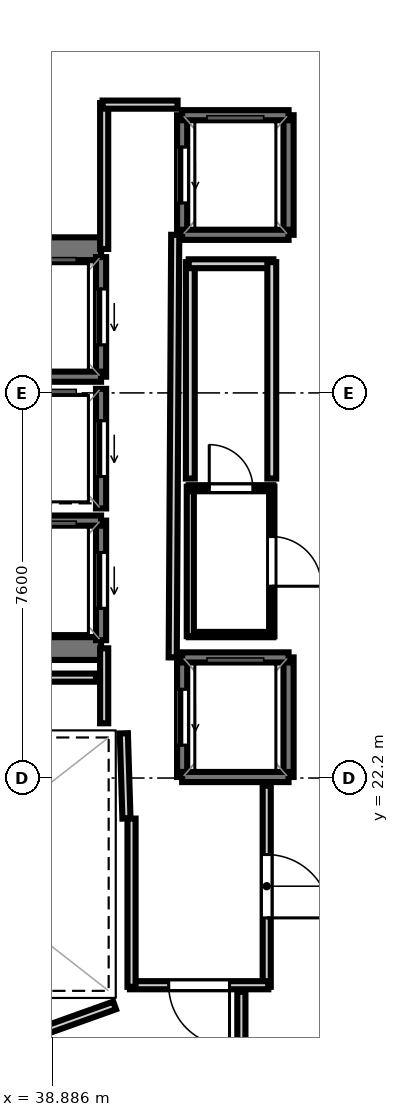
"""IFC4 building model, lengths in metres.
Left out: names, types, materials, properties, quantities, classifications, styles, units other than length and angle.
Written with IfcOpenShell. Run it as: python <this file> out.ifc"""

import sys

from ifc_helpers import new_model, si_unit, direction, frame, frame_2d, origin, place, context, subcontext, project, spatial, rectangle, extrude, element, fill, save


model = new_model("IFC4")
c1 = context("Model", 3, precision=1e-05, world=origin(), true_north=direction((0.0, 1.0)))
c2 = subcontext(c1, "Body", "Model", "MODEL_VIEW")
j1 = project(units=[si_unit("LENGTHUNIT", "METRE"), si_unit("PLANEANGLEUNIT", "RADIAN")], contexts=[c1])
p1 = place(None, origin())
s1 = spatial("IfcSite", under=j1, at=p1, CompositionType="ELEMENT")
p2 = place(p1, origin())
s2 = spatial("IfcBuilding", under=s1, at=p2, CompositionType="ELEMENT")
p3 = place(p2, frame((0.0, 0.0, 325.9)))
s3 = spatial("IfcBuildingStorey", under=s2, at=p3, CompositionType="ELEMENT", Elevation=325.9)
p4 = place(p3, frame((29.33, 32.645, 0.0), z_axis=(0.0, 0.0, 1.0), x_axis=(1.0, 0.0, 0.0)))
e1 = element("IfcWall", 1, at=p4, inside=s3, PredefinedType="SHEAR", context=c2, shape_type="SweptSolid", body=[
    extrude(rectangle(XDim=10.52, YDim=0.45, at=frame_2d((5.26, 0.0))), origin(), (0.0, 0.0, 1.0), 3.52),
])
p5 = place(p4, frame((0.895, 0.0, 0.0)))
e2 = element("IfcOpeningElement", 2, at=p5, cuts=e1, PredefinedType="OPENING", context=c2, shape_type="SweptSolid", body=[
    extrude(rectangle(XDim=1.25, YDim=2.15, at=frame_2d((0.625, 1.075))), frame((0.0, 0.235, 0.0), z_axis=(0.0, -1.0, 0.0), x_axis=(1.0, 0.0, 0.0)), (0.0, 0.0, 1.0), 0.47),
])
p6 = place(p3, frame((29.33, 24.755, 0.0), z_axis=(0.0, 0.0, 1.0), x_axis=(1.0, 0.0, 0.0)))
e3 = element("IfcWall", 3, at=p6, inside=s3, PredefinedType="SHEAR", context=c2, shape_type="SweptSolid", body=[
    extrude(rectangle(XDim=10.52, YDim=0.45, at=frame_2d((5.26, 0.0))), origin(), (0.0, 0.0, 1.0), 3.52),
])
p7 = place(p6, frame((0.695, 0.0, 0.0)))
e4 = element("IfcOpeningElement", 4, at=p7, cuts=e3, PredefinedType="OPENING", context=c2, shape_type="SweptSolid", body=[
    extrude(rectangle(XDim=1.25, YDim=2.15, at=frame_2d((0.625, 1.075))), frame((0.0, 0.235, 0.0), z_axis=(0.0, -1.0, 0.0), x_axis=(1.0, 0.0, 0.0)), (0.0, 0.0, 1.0), 0.47),
])
p8 = place(p3, frame((39.85, 30.12, 0.0), z_axis=(0.0, 0.0, 1.0), x_axis=(0.0, 1.0, 0.0)))
e5 = element("IfcWall", 5, at=p8, inside=s3, PredefinedType="SOLIDWALL", context=c2, shape_type="SweptSolid", body=[
    extrude(rectangle(XDim=2.36, YDim=0.2, at=frame_2d((1.18, 0.0))), origin(), (0.0, 0.0, 1.0), 3.52),
])
p9 = place(p8, frame((0.63, 0.0, 0.0)))
e6 = element("IfcOpeningElement", 6, at=p9, cuts=e5, PredefinedType="OPENING", context=c2, shape_type="SweptSolid", body=[
    extrude(rectangle(XDim=1.1, YDim=2.15, at=frame_2d((0.55, 1.075))), frame((0.0, 0.11, 0.0), z_axis=(0.0, -1.0, 0.0), x_axis=(1.0, 0.0, 0.0)), (0.0, 0.0, 1.0), 0.22),
])
p10 = place(p3, frame((37.75, 30.12, 0.0), z_axis=(0.0, 0.0, 1.0), x_axis=(1.0, 0.0, 0.0)))
e7 = element("IfcWall", 7, at=p10, inside=s3, PredefinedType="SOLIDWALL", context=c2, shape_type="SweptSolid", body=[
    extrude(rectangle(XDim=2.1, YDim=0.2, at=frame_2d((1.05, 0.0))), origin(), (0.0, 0.0, 1.0), 3.52),
])
p11 = place(p3, frame((39.85, 24.92, 0.0), z_axis=(0.0, 0.0, 1.0), x_axis=(0.0, 1.0, 0.0)))
e8 = element("IfcWall", 8, at=p11, inside=s3, PredefinedType="SOLIDWALL", context=c2, shape_type="SweptSolid", body=[
    extrude(rectangle(XDim=2.36, YDim=0.2, at=frame_2d((1.18, 0.0))), origin(), (0.0, 0.0, 1.0), 3.52),
])
p12 = place(p11, frame((0.63, 0.0, 0.0)))
e9 = element("IfcOpeningElement", 9, at=p12, cuts=e8, PredefinedType="OPENING", context=c2, shape_type="SweptSolid", body=[
    extrude(rectangle(XDim=1.1, YDim=2.15, at=frame_2d((0.55, 1.075))), frame((0.0, 0.11, 0.0), z_axis=(0.0, -1.0, 0.0), x_axis=(1.0, 0.0, 0.0)), (0.0, 0.0, 1.0), 0.22),
])
p13 = place(p3, frame((37.75, 27.28, 0.0), z_axis=(0.0, 0.0, 1.0), x_axis=(1.0, 0.0, 0.0)))
e10 = element("IfcWall", 10, at=p13, inside=s3, PredefinedType="SOLIDWALL", context=c2, shape_type="SweptSolid", body=[
    extrude(rectangle(XDim=2.1, YDim=0.2, at=frame_2d((1.05, 0.0))), origin(), (0.0, 0.0, 1.0), 3.52),
])
p14 = place(p3, frame((39.85, 27.52, 0.0), z_axis=(0.0, 0.0, 1.0), x_axis=(0.0, 1.0, 0.0)))
e11 = element("IfcWall", 11, at=p14, inside=s3, PredefinedType="SOLIDWALL", context=c2, shape_type="SweptSolid", body=[
    extrude(rectangle(XDim=2.36, YDim=0.2, at=frame_2d((1.18, 0.0))), origin(), (0.0, 0.0, 1.0), 3.52),
])
p15 = place(p14, frame((0.63, 0.0, 0.0)))
e12 = element("IfcOpeningElement", 12, at=p15, cuts=e11, PredefinedType="OPENING", context=c2, shape_type="SweptSolid", body=[
    extrude(rectangle(XDim=1.1, YDim=2.15, at=frame_2d((0.55, 1.075))), frame((0.0, 0.11, 0.0), z_axis=(0.0, -1.0, 0.0), x_axis=(1.0, 0.0, 0.0)), (0.0, 0.0, 1.0), 0.22),
])
p16 = place(p3, frame((43.55, 22.22, 0.0), z_axis=(0.0, 0.0, 1.0), x_axis=(0.0, 1.0, 0.0)))
e13 = element("IfcWall", 13, at=p16, inside=s3, PredefinedType="SOLIDWALL", context=c2, shape_type="SweptSolid", body=[
    extrude(rectangle(XDim=2.36, YDim=0.2, at=frame_2d((1.18, 0.0))), origin(), (0.0, 0.0, 1.0), 3.52),
])
p17 = place(p3, frame((41.45, 22.22, 0.0), z_axis=(0.0, 0.0, 1.0), x_axis=(0.0, 1.0, 0.0)))
e14 = element("IfcWall", 14, at=p17, inside=s3, PredefinedType="SOLIDWALL", context=c2, shape_type="SweptSolid", body=[
    extrude(rectangle(XDim=2.36, YDim=0.2, at=frame_2d((1.18, 0.0))), origin(), (0.0, 0.0, 1.0), 3.52),
])
p18 = place(p17, frame((0.63, 0.0, 0.0)))
e15 = element("IfcOpeningElement", 15, at=p18, cuts=e14, PredefinedType="OPENING", context=c2, shape_type="SweptSolid", body=[
    extrude(rectangle(XDim=1.1, YDim=2.15, at=frame_2d((0.55, 1.075))), frame((0.0, 0.11, 0.0), z_axis=(0.0, -1.0, 0.0), x_axis=(1.0, 0.0, 0.0)), (0.0, 0.0, 1.0), 0.22),
])
for number, where, z_axis, x_axis in (
    (16, (41.45, 24.58, 0.0), (0.0, 0.0, 1.0), (1.0, 0.0, 0.0)),
    (17, (41.45, 22.22, 0.0), (0.0, 0.0, 1.0), (1.0, 0.0, 0.0)),
):
    element("IfcWall", number, at=place(p3, frame(where, z_axis=z_axis, x_axis=x_axis)), inside=s3, PredefinedType="SOLIDWALL", context=c2, shape_type="SweptSolid", body=[
        extrude(rectangle(XDim=2.1, YDim=0.2, at=frame_2d((1.05, 0.0))), origin(), (0.0, 0.0, 1.0), 3.52),
    ])
p19 = place(p3, frame((43.55, 32.92, 0.0), z_axis=(0.0, 0.0, 1.0), x_axis=(0.0, 1.0, 0.0)))
e18 = element("IfcWall", 18, at=p19, inside=s3, PredefinedType="SOLIDWALL", context=c2, shape_type="SweptSolid", body=[
    extrude(rectangle(XDim=2.36, YDim=0.2, at=frame_2d((1.18, 0.0))), origin(), (0.0, 0.0, 1.0), 3.52),
])
p20 = place(p3, frame((41.45, 32.92, 0.0), z_axis=(0.0, 0.0, 1.0), x_axis=(0.0, 1.0, 0.0)))
e19 = element("IfcWall", 19, at=p20, inside=s3, PredefinedType="SOLIDWALL", context=c2, shape_type="SweptSolid", body=[
    extrude(rectangle(XDim=2.36, YDim=0.2, at=frame_2d((1.18, 0.0))), origin(), (0.0, 0.0, 1.0), 3.52),
])
p21 = place(p20, frame((0.63, 0.0, 0.0)))
e20 = element("IfcOpeningElement", 20, at=p21, cuts=e19, PredefinedType="OPENING", context=c2, shape_type="SweptSolid", body=[
    extrude(rectangle(XDim=1.1, YDim=2.15, at=frame_2d((0.55, 1.075))), frame((0.0, 0.11, 0.0), z_axis=(0.0, -1.0, 0.0), x_axis=(1.0, 0.0, 0.0)), (0.0, 0.0, 1.0), 0.22),
])
for number, where, z_axis, x_axis in (
    (21, (41.45, 35.28, 0.0), (0.0, 0.0, 1.0), (1.0, 0.0, 0.0)),
    (22, (41.45, 32.92, 0.0), (0.0, 0.0, 1.0), (1.0, 0.0, 0.0)),
):
    element("IfcWall", number, at=place(p3, frame(where, z_axis=z_axis, x_axis=x_axis)), inside=s3, PredefinedType="SOLIDWALL", context=c2, shape_type="SweptSolid", body=[
        extrude(rectangle(XDim=2.1, YDim=0.2, at=frame_2d((1.05, 0.0))), origin(), (0.0, 0.0, 1.0), 3.52),
    ])
p22 = place(p3, frame((40.351, 21.401, 0.0), z_axis=(0.0, 0.0, 1.0), x_axis=(-0.031058045979, 0.999517582527, 0.0)))
e23 = element("IfcWall", 23, at=p22, inside=s3, PredefinedType="PARTITIONING", context=c2, shape_type="SweptSolid", body=[
    extrude(rectangle(XDim=1.682, YDim=0.16, at=frame_2d((0.841, 0.0))), origin(), (0.0, 0.0, 1.0), 2.84),
])
p23 = place(p3, frame((39.911, 23.28, 0.0), z_axis=(0.0, 0.0, 1.0), x_axis=(0.0, 1.0, 0.0)))
e24 = element("IfcWall", 24, at=p23, inside=s3, PredefinedType="PARTITIONING", context=c2, shape_type="SweptSolid", body=[
    extrude(rectangle(XDim=1.48, YDim=0.16, at=frame_2d((0.74, 0.0))), origin(), (0.0, 0.0, 1.0), 2.84),
])
p24 = place(p3, frame((39.911, 32.64, 0.0), z_axis=(0.0, 0.0, 1.0), x_axis=(0.0, 1.0, 0.0)))
e25 = element("IfcWall", 25, at=p24, inside=s3, PredefinedType="PARTITIONING", context=c2, shape_type="SweptSolid", body=[
    extrude(rectangle(XDim=2.88, YDim=0.16, at=frame_2d((1.44, 0.0))), origin(), (0.0, 0.0, 1.0), 2.84),
])
p25 = place(p3, frame((39.88, 35.489, 0.0), z_axis=(0.0, 0.0, 1.0), x_axis=(1.0, 0.0, 0.0)))
e26 = element("IfcWall", 26, at=p25, inside=s3, PredefinedType="PARTITIONING", context=c2, shape_type="SweptSolid", body=[
    extrude(rectangle(XDim=1.48, YDim=0.16, at=frame_2d((0.74, 0.0))), origin(), (0.0, 0.0, 1.0), 2.84),
])
p26 = place(p3, frame((41.313, 32.92, 0.0), z_axis=(0.0, 0.0, 1.0), x_axis=(-0.005942518022, -0.999982343084, 0.0)))
e27 = element("IfcWall", 27, at=p26, inside=s3, PredefinedType="PARTITIONING", context=c2, shape_type="SweptSolid", body=[
    extrude(rectangle(XDim=8.34, YDim=0.16, at=frame_2d((4.17, 0.0))), origin(), (0.0, 0.0, 1.0), 2.84),
])
p27 = place(p3, frame((43.119, 22.05, 0.0), z_axis=(0.0, 0.0, 1.0), x_axis=(0.0, -1.0, 0.0)))
e28 = element("IfcWall", 28, at=p27, inside=s3, PredefinedType="PARTITIONING", context=c2, shape_type="SweptSolid", body=[
    extrude(rectangle(XDim=3.97, YDim=0.16, at=frame_2d((1.985, 0.0))), origin(), (0.0, 0.0, 1.0), 2.84),
])
p28 = place(p27, frame((1.36, 0.0, 0.0)))
e29 = element("IfcOpeningElement", 29, at=p28, cuts=e28, PredefinedType="OPENING", context=c2, shape_type="SweptSolid", body=[
    extrude(rectangle(XDim=1.25, YDim=2.2, at=frame_2d((0.625, 1.1))), frame((0.0, 0.09, 0.0), z_axis=(0.0, -1.0, 0.0), x_axis=(1.0, 0.0, 0.0)), (0.0, 0.0, 1.0), 0.18),
])
p29 = place(p3, frame((43.15, 18.111, 0.0), z_axis=(0.0, 0.0, 1.0), x_axis=(-1.0, 0.0, 0.0)))
e30 = element("IfcWall", 30, at=p29, inside=s3, PredefinedType="PARTITIONING", context=c2, shape_type="SweptSolid", body=[
    extrude(rectangle(XDim=2.73, YDim=0.16, at=frame_2d((1.365, 0.0))), origin(), (0.0, 0.0, 1.0), 2.84),
])
p30 = place(p29, frame((0.765, 0.0, 0.0)))
e31 = element("IfcOpeningElement", 31, at=p30, cuts=e30, PredefinedType="OPENING", context=c2, shape_type="SweptSolid", body=[
    extrude(rectangle(XDim=1.2, YDim=2.15, at=frame_2d((0.6, 1.075))), frame((0.0, 0.09, 0.0), z_axis=(0.0, -1.0, 0.0), x_axis=(1.0, 0.0, 0.0)), (0.0, 0.0, 1.0), 0.18),
])
p31 = place(p3, frame((40.451, 18.08, 0.0), z_axis=(0.0, 0.0, 1.0), x_axis=(0.0, 1.0, 0.0)))
e32 = element("IfcWall", 32, at=p31, inside=s3, PredefinedType="PARTITIONING", context=c2, shape_type="SweptSolid", body=[
    extrude(rectangle(XDim=3.32, YDim=0.16, at=frame_2d((1.66, 0.0))), origin(), (0.0, 0.0, 1.0), 2.84),
])
p32 = place(p3, frame((43.25, 25.031, 0.0), z_axis=(0.0, 0.0, 1.0), x_axis=(-1.0, 0.0, 0.0)))
e33 = element("IfcWall", 33, at=p32, inside=s3, PredefinedType="PARTITIONING", context=c2, shape_type="SweptSolid", body=[
    extrude(rectangle(XDim=1.67, YDim=0.105, at=frame_2d((0.835, 0.0))), origin(), (0.0, 0.0, 1.0), 2.84),
])
p33 = place(p3, frame((41.611, 25.0, 0.0), z_axis=(0.0, 0.0, 1.0), x_axis=(0.0, 1.0, 0.0)))
e34 = element("IfcWall", 34, at=p33, inside=s3, PredefinedType="PARTITIONING", context=c2, shape_type="SweptSolid", body=[
    extrude(rectangle(XDim=2.95, YDim=0.14, at=frame_2d((1.475, 0.0))), origin(), (0.0, 0.0, 1.0), 2.84),
])
p34 = place(p3, frame((41.58, 27.919, 0.0), z_axis=(0.0, 0.0, 1.0), x_axis=(1.0, 0.0, 0.0)))
e35 = element("IfcWall", 35, at=p34, inside=s3, PredefinedType="PARTITIONING", context=c2, shape_type="SweptSolid", body=[
    extrude(rectangle(XDim=1.67, YDim=0.12, at=frame_2d((0.835, 0.0))), origin(), (0.0, 0.0, 1.0), 2.84),
])
p35 = place(p34, frame((0.405, 0.0, 0.0)))
e36 = element("IfcOpeningElement", 36, at=p35, cuts=e35, PredefinedType="OPENING", context=c2, shape_type="SweptSolid", body=[
    extrude(rectangle(XDim=0.86, YDim=2.05, at=frame_2d((0.43, 1.025))), frame((0.0, 0.07, 0.0), z_axis=(0.0, -1.0, 0.0), x_axis=(1.0, 0.0, 0.0)), (0.0, 0.0, 1.0), 0.14),
])
p36 = place(p3, frame((43.219, 27.95, 0.0), z_axis=(0.0, 0.0, 1.0), x_axis=(0.0, -1.0, 0.0)))
e37 = element("IfcWall", 37, at=p36, inside=s3, PredefinedType="PARTITIONING", context=c2, shape_type="SweptSolid", body=[
    extrude(rectangle(XDim=2.95, YDim=0.105, at=frame_2d((1.475, 0.0))), origin(), (0.0, 0.0, 1.0), 2.84),
])
p37 = place(p36, frame((0.985, 0.0, 0.0)))
e38 = element("IfcOpeningElement", 38, at=p37, cuts=e37, PredefinedType="OPENING", context=c2, shape_type="SweptSolid", body=[
    extrude(rectangle(XDim=0.98, YDim=2.1, at=frame_2d((0.49, 1.05))), frame((0.0, 0.062, 0.0), z_axis=(0.0, -1.0, 0.0), x_axis=(1.0, 0.0, 0.0)), (0.0, 0.0, 1.0), 0.125),
])
p38 = place(p3, frame((41.611, 28.11, 0.0), z_axis=(0.0, 0.0, 1.0), x_axis=(0.0, 1.0, 0.0)))
e39 = element("IfcWall", 39, at=p38, inside=s3, PredefinedType="PLUMBINGWALL", context=c2, shape_type="SweptSolid", body=[
    extrude(rectangle(XDim=4.27, YDim=0.175, at=frame_2d((2.135, 0.0))), origin(), (0.0, 0.0, 1.0), 2.84),
])
p39 = place(p3, frame((41.58, 32.349, 0.0), z_axis=(0.0, 0.0, 1.0), x_axis=(1.0, 0.0, 0.0)))
e40 = element("IfcWall", 40, at=p39, inside=s3, PredefinedType="PLUMBINGWALL", context=c2, shape_type="SweptSolid", body=[
    extrude(rectangle(XDim=1.67, YDim=0.175, at=frame_2d((0.835, 0.0))), origin(), (0.0, 0.0, 1.0), 2.84),
])
p40 = place(p3, frame((43.219, 32.38, 0.0), z_axis=(0.0, 0.0, 1.0), x_axis=(0.0, -1.0, 0.0)))
e41 = element("IfcWall", 41, at=p40, inside=s3, PredefinedType="PLUMBINGWALL", context=c2, shape_type="SweptSolid", body=[
    extrude(rectangle(XDim=4.27, YDim=0.175, at=frame_2d((2.135, 0.0))), origin(), (0.0, 0.0, 1.0), 2.84),
])
p41 = place(p3, frame((39.75, 24.181, 0.0), z_axis=(0.0, 0.0, 1.0), x_axis=(-1.0, 0.0, 0.0)))
e42 = element("IfcWall", 42, at=p41, inside=s3, PredefinedType="PARTITIONING", context=c2, shape_type="SweptSolid", body=[
    extrude(rectangle(XDim=6.22, YDim=0.16, at=frame_2d((3.11, 0.0))), origin(), (0.0, 0.0, 1.0), 2.84),
])
p42 = place(p3, frame((36.81, 16.529, 0.0), z_axis=(0.0, 0.0, 1.0), x_axis=(0.941548344365, 0.33687789364, 0.0)))
e43 = element("IfcWall", 43, at=p42, inside=s3, PredefinedType="PARTITIONING", context=c2, shape_type="SweptSolid", body=[
    extrude(rectangle(XDim=3.513, YDim=0.16, at=frame_2d((1.756, 0.0))), origin(), (0.0, 0.0, 1.0), 2.84),
])
p43 = place(p3, frame((42.619, 17.98, 0.0), z_axis=(0.0, 0.0, 1.0), x_axis=(0.0, -1.0, 0.0)))
e44 = element("IfcWall", 44, at=p43, inside=s3, PredefinedType="PARTITIONING", context=c2, shape_type="SweptSolid", body=[
    extrude(rectangle(XDim=1.93, YDim=0.16, at=frame_2d((0.965, 0.0))), origin(), (0.0, 0.0, 1.0), 2.84),
])
p44 = place(p9, origin())
e45 = element("IfcDoor", 45, at=p44, inside=s3, OperationType="SLIDING_TO_LEFT", PredefinedType="DOOR", context=c2, shape_type="SweptSolid", body=[
    extrude(rectangle(XDim=1.1, YDim=2.15, at=frame_2d((0.55, 1.075))), frame((0.0, 0.025, 0.0), z_axis=(0.0, -1.0, 0.0), x_axis=(1.0, 0.0, 0.0)), (0.0, 0.0, 1.0), 0.05),
])
fill(e6, e45)
p45 = place(p12, origin())
e46 = element("IfcDoor", 46, at=p45, inside=s3, OperationType="SLIDING_TO_LEFT", PredefinedType="DOOR", context=c2, shape_type="SweptSolid", body=[
    extrude(rectangle(XDim=1.1, YDim=2.15, at=frame_2d((0.55, 1.075))), frame((0.0, 0.025, 0.0), z_axis=(0.0, -1.0, 0.0), x_axis=(1.0, 0.0, 0.0)), (0.0, 0.0, 1.0), 0.05),
])
fill(e9, e46)
p46 = place(p15, origin())
e47 = element("IfcDoor", 47, at=p46, inside=s3, OperationType="SLIDING_TO_LEFT", PredefinedType="DOOR", context=c2, shape_type="SweptSolid", body=[
    extrude(rectangle(XDim=1.1, YDim=2.15, at=frame_2d((0.55, 1.075))), frame((0.0, 0.025, 0.0), z_axis=(0.0, -1.0, 0.0), x_axis=(1.0, 0.0, 0.0)), (0.0, 0.0, 1.0), 0.05),
])
fill(e12, e47)
p47 = place(p18, origin())
e48 = element("IfcDoor", 48, at=p47, inside=s3, OperationType="SLIDING_TO_LEFT", PredefinedType="DOOR", context=c2, shape_type="SweptSolid", body=[
    extrude(rectangle(XDim=1.1, YDim=2.15, at=frame_2d((0.55, 1.075))), frame((0.0, 0.025, 0.0), z_axis=(0.0, -1.0, 0.0), x_axis=(1.0, 0.0, 0.0)), (0.0, 0.0, 1.0), 0.05),
])
fill(e15, e48)
p48 = place(p21, origin())
e49 = element("IfcDoor", 49, at=p48, inside=s3, OperationType="SLIDING_TO_LEFT", PredefinedType="DOOR", context=c2, shape_type="SweptSolid", body=[
    extrude(rectangle(XDim=1.1, YDim=2.15, at=frame_2d((0.55, 1.075))), frame((0.0, 0.025, 0.0), z_axis=(0.0, -1.0, 0.0), x_axis=(1.0, 0.0, 0.0)), (0.0, 0.0, 1.0), 0.05),
])
fill(e20, e49)
p49 = place(p30, origin())
e50 = element("IfcDoor", 50, at=p49, inside=s3, OperationType="SINGLE_SWING_LEFT", PredefinedType="DOOR", context=c2, shape_type="SweptSolid", body=[
    extrude(rectangle(XDim=1.2, YDim=2.15, at=frame_2d((0.6, 1.075))), frame((0.0, 0.025, 0.0), z_axis=(0.0, -1.0, 0.0), x_axis=(1.0, 0.0, 0.0)), (0.0, 0.0, 1.0), 0.05),
])
fill(e31, e50)
p50 = place(p28, origin())
e51 = element("IfcDoor", 51, at=p50, inside=s3, OperationType="SINGLE_SWING_RIGHT", PredefinedType="DOOR", context=c2, shape_type="SweptSolid", body=[
    extrude(rectangle(XDim=1.25, YDim=2.2, at=frame_2d((0.625, 1.1))), frame((0.0, 0.025, 0.0), z_axis=(0.0, -1.0, 0.0), x_axis=(1.0, 0.0, 0.0)), (0.0, 0.0, 1.0), 0.05),
])
fill(e29, e51)
p51 = place(p37, origin())
e52 = element("IfcDoor", 52, at=p51, inside=s3, OperationType="SINGLE_SWING_RIGHT", PredefinedType="DOOR", context=c2, shape_type="SweptSolid", body=[
    extrude(rectangle(XDim=0.98, YDim=2.1, at=frame_2d((0.49, 1.05))), frame((0.0, 0.025, 0.0), z_axis=(0.0, -1.0, 0.0), x_axis=(1.0, 0.0, 0.0)), (0.0, 0.0, 1.0), 0.05),
])
fill(e38, e52)
p52 = place(p35, origin())
e53 = element("IfcDoor", 53, at=p52, inside=s3, OperationType="SINGLE_SWING_LEFT", PredefinedType="DOOR", context=c2, shape_type="SweptSolid", body=[
    extrude(rectangle(XDim=0.86, YDim=2.05, at=frame_2d((0.43, 1.025))), frame((0.0, 0.025, 0.0), z_axis=(0.0, -1.0, 0.0), x_axis=(1.0, 0.0, 0.0)), (0.0, 0.0, 1.0), 0.05),
])
fill(e36, e53)
save(model, sys.argv[1])
